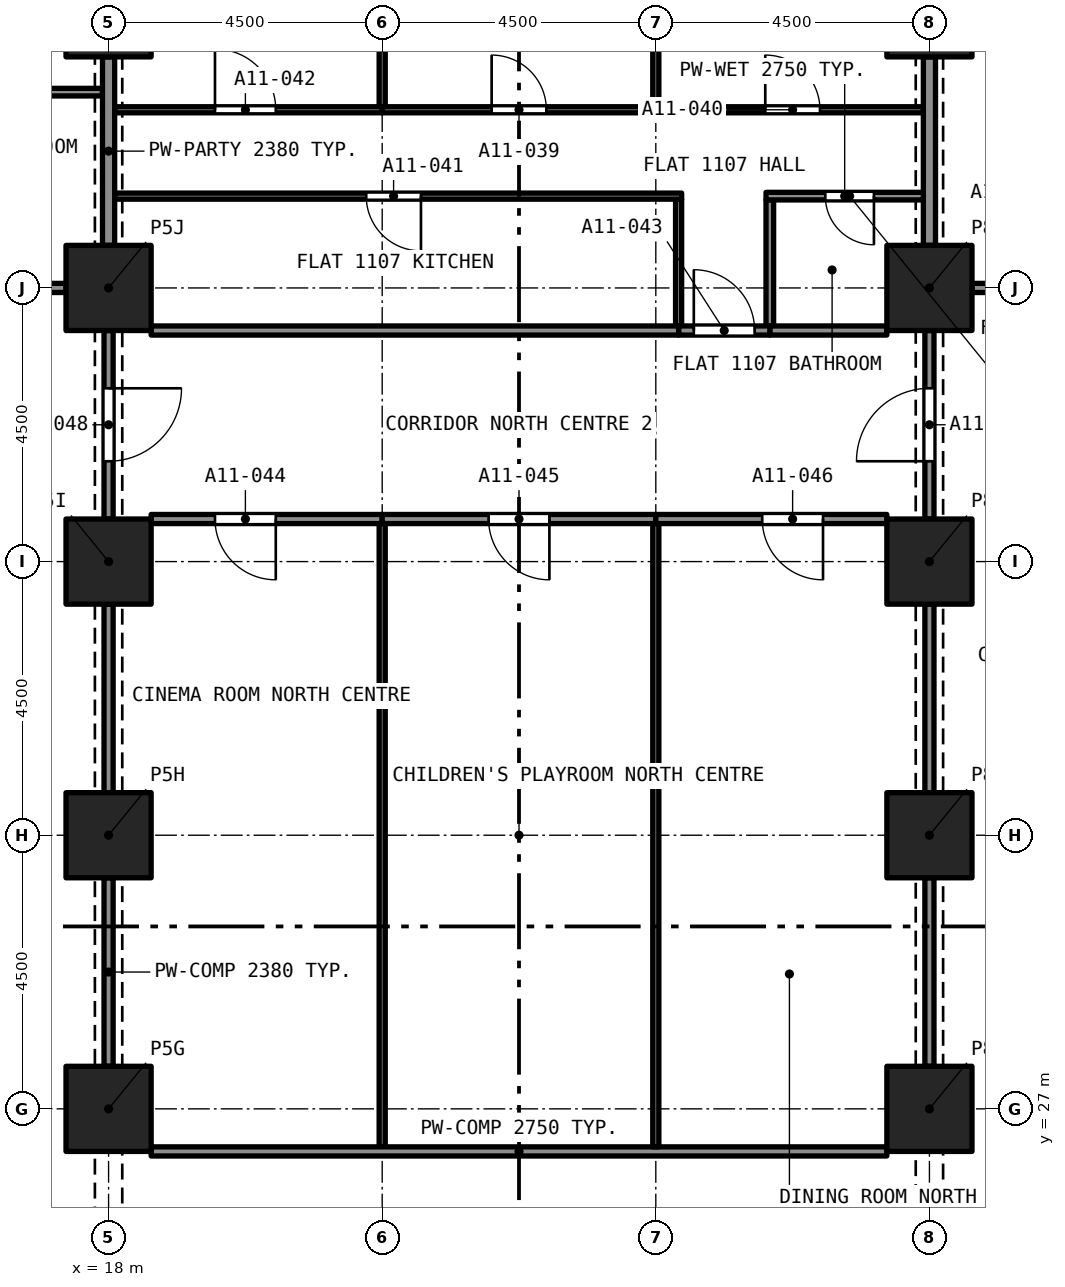
"""IFC4 building model, lengths in metres.
Left out: names, types, materials, properties, quantities, classifications, styles, units other than length and angle.
Written with IfcOpenShell. Run it as: python <this file> out.ifc"""

import sys

from ifc_helpers import new_model, si_unit, direction, frame, frame_2d, origin, origin_2d, place, context, subcontext, project, spatial, rectangle, extrude, element, fill, save


model = new_model("IFC4")
c1 = context("Model", 3, precision=1e-05, world=origin(), true_north=direction((0.0, 1.0)))
c2 = subcontext(c1, "Body", "Model", "MODEL_VIEW")
j1 = project(units=[si_unit("LENGTHUNIT", "METRE"), si_unit("PLANEANGLEUNIT", "RADIAN")], contexts=[c1])
p1 = place(None, origin())
s1 = spatial("IfcSite", under=j1, at=p1, CompositionType="ELEMENT")
p2 = place(p1, origin())
s2 = spatial("IfcBuilding", under=s1, at=p2, CompositionType="ELEMENT")
p3 = place(p2, frame((0.0, 0.0, 46.4)))
s3 = spatial("IfcBuildingStorey", under=s2, at=p3, CompositionType="ELEMENT", Elevation=46.4)
for number, where, z_axis, x_axis in (
    (1, (18.0, 27.0, 0.0), (0.0, 0.0, 1.0), (1.0, 0.0, 0.0)),
    (2, (31.5, 27.0, 0.0), (0.0, 0.0, 1.0), (1.0, 0.0, 0.0)),
    (3, (18.0, 31.5, 0.0), (0.0, 0.0, 1.0), (1.0, 0.0, 0.0)),
    (4, (31.5, 31.5, 0.0), (0.0, 0.0, 1.0), (1.0, 0.0, 0.0)),
    (5, (18.0, 36.0, 0.0), (0.0, 0.0, 1.0), (1.0, 0.0, 0.0)),
    (6, (31.5, 36.0, 0.0), (0.0, 0.0, 1.0), (1.0, 0.0, 0.0)),
    (7, (18.0, 40.5, 0.0), (0.0, 0.0, 1.0), (1.0, 0.0, 0.0)),
    (8, (31.5, 40.5, 0.0), (0.0, 0.0, 1.0), (1.0, 0.0, 0.0)),
    (9, (18.0, 45.0, 0.0), (0.0, 0.0, 1.0), (1.0, 0.0, 0.0)),
    (10, (31.5, 45.0, 0.0), (0.0, 0.0, 1.0), (1.0, 0.0, 0.0)),
):
    element("IfcColumn", number, at=place(p3, frame(where, z_axis=z_axis, x_axis=x_axis)), inside=s3, PredefinedType="COLUMN", context=c2, shape_type="SweptSolid", body=[
        extrude(rectangle(XDim=1.4, YDim=1.4, at=origin_2d()), origin(), (0.0, 0.0, 1.0), 3.2),
    ])
p4 = place(p3, frame((17.9, 43.72, 0.0), z_axis=(0.0, 0.0, 1.0), x_axis=(-1.0, 0.0, 0.0)))
e11 = element("IfcWall", 11, at=p4, inside=s3, PredefinedType="PARTITIONING", context=c2, shape_type="SweptSolid", body=[
    extrude(rectangle(XDim=4.327, YDim=0.125, at=frame_2d((2.163, 0.0))), origin(), (0.0, 0.0, 1.0), 2.9),
])
p5 = place(p4, frame((1.713, 0.0, 0.0)))
e12 = element("IfcOpeningElement", 12, at=p5, cuts=e11, PredefinedType="OPENING", context=c2, shape_type="SweptSolid", body=[
    extrude(rectangle(XDim=0.8, YDim=2.1, at=frame_2d((0.4, 1.05))), frame((0.0, 0.073, 0.0), z_axis=(0.0, -1.0, 0.0), x_axis=(1.0, 0.0, 0.0)), (0.0, 0.0, 1.0), 0.145),
])
p6 = place(p3, frame((18.0, 41.2, 0.0), z_axis=(0.0, 0.0, 1.0), x_axis=(0.0, 1.0, 0.0)))
e13 = element("IfcWall", 13, at=p6, inside=s3, PredefinedType="PARTITIONING", context=c2, shape_type="SweptSolid", body=[
    extrude(rectangle(XDim=3.1, YDim=0.2, at=frame_2d((1.55, 0.0))), origin(), (0.0, 0.0, 1.0), 2.38),
])
p7 = place(p3, frame((13.511, 40.5, 0.0), z_axis=(0.0, 0.0, 1.0), x_axis=(1.0, 0.0, 0.0)))
e14 = element("IfcWall", 14, at=p7, inside=s3, PredefinedType="PARTITIONING", context=c2, shape_type="SweptSolid", body=[
    extrude(rectangle(XDim=3.789, YDim=0.15, at=frame_2d((1.895, 0.0))), origin(), (0.0, 0.0, 1.0), 2.9),
])
p8 = place(p3, frame((31.5, 41.2, 0.0), z_axis=(0.0, 0.0, 1.0), x_axis=(0.0, 1.0, 0.0)))
e15 = element("IfcWall", 15, at=p8, inside=s3, PredefinedType="PARTITIONING", context=c2, shape_type="SweptSolid", body=[
    extrude(rectangle(XDim=3.1, YDim=0.2, at=frame_2d((1.55, 0.0))), origin(), (0.0, 0.0, 1.0), 2.38),
])
p9 = place(p3, frame((32.2, 40.5, 0.0), z_axis=(0.0, 0.0, 1.0), x_axis=(1.0, 0.0, 0.0)))
e16 = element("IfcWall", 16, at=p9, inside=s3, PredefinedType="PARTITIONING", context=c2, shape_type="SweptSolid", body=[
    extrude(rectangle(XDim=2.3, YDim=0.15, at=frame_2d((1.15, 0.0))), origin(), (0.0, 0.0, 1.0), 2.9),
])
p10 = place(p9, frame((1.05, 0.0, 0.0)))
e17 = element("IfcOpeningElement", 17, at=p10, cuts=e16, PredefinedType="OPENING", context=c2, shape_type="SweptSolid", body=[
    extrude(rectangle(XDim=1.0, YDim=2.1, at=frame_2d((0.5, 1.05))), frame((0.0, 0.085, 0.0), z_axis=(0.0, -1.0, 0.0), x_axis=(1.0, 0.0, 0.0)), (0.0, 0.0, 1.0), 0.17),
])
p11 = place(p3, frame((28.875, 39.875, 0.0), z_axis=(0.0, 0.0, 1.0), x_axis=(0.0, 1.0, 0.0)))
e18 = element("IfcWall", 18, at=p11, inside=s3, PredefinedType="PARTITIONING", context=c2, shape_type="SweptSolid", body=[
    extrude(rectangle(XDim=2.073, YDim=0.125, at=frame_2d((1.036, 0.0))), origin(), (0.0, 0.0, 1.0), 2.75),
])
p12 = place(p3, frame((31.4, 42.01, 0.0), z_axis=(0.0, 0.0, 1.0), x_axis=(-1.0, 0.0, 0.0)))
e19 = element("IfcWall", 19, at=p12, inside=s3, PredefinedType="PARTITIONING", context=c2, shape_type="SweptSolid", body=[
    extrude(rectangle(XDim=2.587, YDim=0.125, at=frame_2d((1.294, 0.0))), origin(), (0.0, 0.0, 1.0), 2.75),
])
p13 = place(p12, frame((0.812, 0.0, 0.0)))
e20 = element("IfcOpeningElement", 20, at=p13, cuts=e19, PredefinedType="OPENING", context=c2, shape_type="SweptSolid", body=[
    extrude(rectangle(XDim=0.8, YDim=2.1, at=frame_2d((0.4, 1.05))), frame((0.0, 0.073, 0.0), z_axis=(0.0, -1.0, 0.0), x_axis=(1.0, 0.0, 0.0)), (0.0, 0.0, 1.0), 0.145),
])
p14 = place(p3, frame((28.875, 39.8, 0.0), z_axis=(0.0, 0.0, 1.0), x_axis=(1.0, 0.0, 0.0)))
e21 = element("IfcWall", 21, at=p14, inside=s3, PredefinedType="PARTITIONING", context=c2, shape_type="SweptSolid", body=[
    extrude(rectangle(XDim=1.925, YDim=0.15, at=frame_2d((0.962, 0.0))), origin(), (0.0, 0.0, 1.0), 2.75),
])
p15 = place(p3, frame((27.0, 43.48, 0.0), z_axis=(0.0, 0.0, 1.0), x_axis=(0.0, 1.0, 0.0)))
e22 = element("IfcWall", 22, at=p15, inside=s3, PredefinedType="PARTITIONING", context=c2, shape_type="SweptSolid", body=[
    extrude(rectangle(XDim=5.32, YDim=0.1, at=frame_2d((2.66, 0.0))), origin(), (0.0, 0.0, 1.0), 2.75),
])
p16 = place(p3, frame((22.5, 43.43, 0.0), z_axis=(0.0, 0.0, 1.0), x_axis=(1.0, 0.0, 0.0)))
e23 = element("IfcWall", 23, at=p16, inside=s3, PredefinedType="PARTITIONING", context=c2, shape_type="SweptSolid", body=[
    extrude(rectangle(XDim=4.5, YDim=0.1, at=frame_2d((2.25, 0.0))), origin(), (0.0, 0.0, 1.0), 2.75),
])
p17 = place(p16, frame((1.8, 0.0, 0.0)))
e24 = element("IfcOpeningElement", 24, at=p17, cuts=e23, PredefinedType="OPENING", context=c2, shape_type="SweptSolid", body=[
    extrude(rectangle(XDim=0.9, YDim=2.1, at=frame_2d((0.45, 1.05))), frame((0.0, 0.06, 0.0), z_axis=(0.0, -1.0, 0.0), x_axis=(1.0, 0.0, 0.0)), (0.0, 0.0, 1.0), 0.12),
])
p18 = place(p3, frame((22.5, 43.48, 0.0), z_axis=(0.0, 0.0, 1.0), x_axis=(0.0, 1.0, 0.0)))
e25 = element("IfcWall", 25, at=p18, inside=s3, PredefinedType="PARTITIONING", context=c2, shape_type="SweptSolid", body=[
    extrude(rectangle(XDim=5.32, YDim=0.1, at=frame_2d((2.66, 0.0))), origin(), (0.0, 0.0, 1.0), 2.75),
])
p19 = place(p3, frame((27.0, 43.43, 0.0), z_axis=(0.0, 0.0, 1.0), x_axis=(1.0, 0.0, 0.0)))
e26 = element("IfcWall", 26, at=p19, inside=s3, PredefinedType="PARTITIONING", context=c2, shape_type="SweptSolid", body=[
    extrude(rectangle(XDim=4.4, YDim=0.1, at=frame_2d((2.2, 0.0))), origin(), (0.0, 0.0, 1.0), 2.75),
])
p20 = place(p19, frame((1.8, 0.0, 0.0)))
e27 = element("IfcOpeningElement", 27, at=p20, cuts=e26, PredefinedType="OPENING", context=c2, shape_type="SweptSolid", body=[
    extrude(rectangle(XDim=0.9, YDim=2.1, at=frame_2d((0.45, 1.05))), frame((0.0, 0.06, 0.0), z_axis=(0.0, -1.0, 0.0), x_axis=(1.0, 0.0, 0.0)), (0.0, 0.0, 1.0), 0.12),
])
p21 = place(p3, frame((27.375, 39.875, 0.0), z_axis=(0.0, 0.0, 1.0), x_axis=(0.0, 1.0, 0.0)))
e28 = element("IfcWall", 28, at=p21, inside=s3, PredefinedType="PARTITIONING", context=c2, shape_type="SweptSolid", body=[
    extrude(rectangle(XDim=2.085, YDim=0.1, at=frame_2d((1.042, 0.0))), origin(), (0.0, 0.0, 1.0), 2.75),
])
p22 = place(p3, frame((27.425, 42.01, 0.0), z_axis=(0.0, 0.0, 1.0), x_axis=(-1.0, 0.0, 0.0)))
e29 = element("IfcWall", 29, at=p22, inside=s3, PredefinedType="PARTITIONING", context=c2, shape_type="SweptSolid", body=[
    extrude(rectangle(XDim=9.325, YDim=0.1, at=frame_2d((4.663, 0.0))), origin(), (0.0, 0.0, 1.0), 2.75),
])
p23 = place(p22, frame((4.288, 0.0, 0.0)))
e30 = element("IfcOpeningElement", 30, at=p23, cuts=e29, PredefinedType="OPENING", context=c2, shape_type="SweptSolid", body=[
    extrude(rectangle(XDim=0.9, YDim=2.1, at=frame_2d((0.45, 1.05))), frame((0.0, 0.06, 0.0), z_axis=(0.0, -1.0, 0.0), x_axis=(1.0, 0.0, 0.0)), (0.0, 0.0, 1.0), 0.12),
])
p24 = place(p3, frame((18.1, 43.43, 0.0), z_axis=(0.0, 0.0, 1.0), x_axis=(1.0, 0.0, 0.0)))
e31 = element("IfcWall", 31, at=p24, inside=s3, PredefinedType="PARTITIONING", context=c2, shape_type="SweptSolid", body=[
    extrude(rectangle(XDim=4.4, YDim=0.1, at=frame_2d((2.2, 0.0))), origin(), (0.0, 0.0, 1.0), 2.75),
])
p25 = place(p24, frame((1.65, 0.0, 0.0)))
e32 = element("IfcOpeningElement", 32, at=p25, cuts=e31, PredefinedType="OPENING", context=c2, shape_type="SweptSolid", body=[
    extrude(rectangle(XDim=1.0, YDim=2.1, at=frame_2d((0.5, 1.05))), frame((0.0, 0.06, 0.0), z_axis=(0.0, -1.0, 0.0), x_axis=(1.0, 0.0, 0.0)), (0.0, 0.0, 1.0), 0.12),
])
p26 = place(p3, frame((27.375, 39.8, 0.0), z_axis=(0.0, 0.0, 1.0), x_axis=(1.0, 0.0, 0.0)))
e33 = element("IfcWall", 33, at=p26, inside=s3, PredefinedType="PARTITIONING", context=c2, shape_type="SweptSolid", body=[
    extrude(rectangle(XDim=1.5, YDim=0.15, at=frame_2d((0.75, 0.0))), origin(), (0.0, 0.0, 1.0), 2.75),
])
p27 = place(p26, frame((0.25, 0.0, 0.0)))
e34 = element("IfcOpeningElement", 34, at=p27, cuts=e33, PredefinedType="OPENING", context=c2, shape_type="SweptSolid", body=[
    extrude(rectangle(XDim=1.0, YDim=2.1, at=frame_2d((0.5, 1.05))), frame((0.0, 0.085, 0.0), z_axis=(0.0, -1.0, 0.0), x_axis=(1.0, 0.0, 0.0)), (0.0, 0.0, 1.0), 0.17),
])
p28 = place(p3, frame((18.7, 39.8, 0.0), z_axis=(0.0, 0.0, 1.0), x_axis=(1.0, 0.0, 0.0)))
e35 = element("IfcWall", 35, at=p28, inside=s3, PredefinedType="PARTITIONING", context=c2, shape_type="SweptSolid", body=[
    extrude(rectangle(XDim=8.675, YDim=0.15, at=frame_2d((4.337, 0.0))), origin(), (0.0, 0.0, 1.0), 2.75),
])
p29 = place(p3, frame((22.5, 36.7, 0.0), z_axis=(0.0, 0.0, 1.0), x_axis=(-1.0, 0.0, 0.0)))
e36 = element("IfcWall", 36, at=p29, inside=s3, PredefinedType="PARTITIONING", context=c2, shape_type="SweptSolid", body=[
    extrude(rectangle(XDim=3.8, YDim=0.15, at=frame_2d((1.9, 0.0))), origin(), (0.0, 0.0, 1.0), 2.75),
])
p30 = place(p29, frame((1.75, 0.0, 0.0)))
e37 = element("IfcOpeningElement", 37, at=p30, cuts=e36, PredefinedType="OPENING", context=c2, shape_type="SweptSolid", body=[
    extrude(rectangle(XDim=1.0, YDim=2.1, at=frame_2d((0.5, 1.05))), frame((0.0, 0.085, 0.0), z_axis=(0.0, -1.0, 0.0), x_axis=(1.0, 0.0, 0.0)), (0.0, 0.0, 1.0), 0.17),
])
p31 = place(p3, frame((27.0, 36.7, 0.0), z_axis=(0.0, 0.0, 1.0), x_axis=(-1.0, 0.0, 0.0)))
e38 = element("IfcWall", 38, at=p31, inside=s3, PredefinedType="PARTITIONING", context=c2, shape_type="SweptSolid", body=[
    extrude(rectangle(XDim=4.5, YDim=0.15, at=frame_2d((2.25, 0.0))), origin(), (0.0, 0.0, 1.0), 2.75),
])
p32 = place(p31, frame((1.75, 0.0, 0.0)))
e39 = element("IfcOpeningElement", 39, at=p32, cuts=e38, PredefinedType="OPENING", context=c2, shape_type="SweptSolid", body=[
    extrude(rectangle(XDim=1.0, YDim=2.1, at=frame_2d((0.5, 1.05))), frame((0.0, 0.085, 0.0), z_axis=(0.0, -1.0, 0.0), x_axis=(1.0, 0.0, 0.0)), (0.0, 0.0, 1.0), 0.17),
])
p33 = place(p3, frame((30.8, 36.7, 0.0), z_axis=(0.0, 0.0, 1.0), x_axis=(-1.0, 0.0, 0.0)))
e40 = element("IfcWall", 40, at=p33, inside=s3, PredefinedType="PARTITIONING", context=c2, shape_type="SweptSolid", body=[
    extrude(rectangle(XDim=3.8, YDim=0.15, at=frame_2d((1.9, 0.0))), origin(), (0.0, 0.0, 1.0), 2.75),
])
p34 = place(p33, frame((1.05, 0.0, 0.0)))
e41 = element("IfcOpeningElement", 41, at=p34, cuts=e40, PredefinedType="OPENING", context=c2, shape_type="SweptSolid", body=[
    extrude(rectangle(XDim=1.0, YDim=2.1, at=frame_2d((0.5, 1.05))), frame((0.0, 0.085, 0.0), z_axis=(0.0, -1.0, 0.0), x_axis=(1.0, 0.0, 0.0)), (0.0, 0.0, 1.0), 0.17),
])
p35 = place(p3, frame((31.5, 36.7, 0.0), z_axis=(0.0, 0.0, 1.0), x_axis=(0.0, 1.0, 0.0)))
e42 = element("IfcWall", 42, at=p35, inside=s3, PredefinedType="PARTITIONING", context=c2, shape_type="SweptSolid", body=[
    extrude(rectangle(XDim=3.1, YDim=0.15, at=frame_2d((1.55, 0.0))), origin(), (0.0, 0.0, 1.0), 2.38),
])
p36 = place(p35, frame((0.95, 0.0, 0.0)))
e43 = element("IfcOpeningElement", 43, at=p36, cuts=e42, PredefinedType="OPENING", context=c2, shape_type="SweptSolid", body=[
    extrude(rectangle(XDim=1.2, YDim=2.1, at=frame_2d((0.6, 1.05))), frame((0.0, 0.085, 0.0), z_axis=(0.0, -1.0, 0.0), x_axis=(1.0, 0.0, 0.0)), (0.0, 0.0, 1.0), 0.17),
])
p37 = place(p3, frame((18.0, 39.8, 0.0), z_axis=(0.0, 0.0, 1.0), x_axis=(0.0, -1.0, 0.0)))
e44 = element("IfcWall", 44, at=p37, inside=s3, PredefinedType="PARTITIONING", context=c2, shape_type="SweptSolid", body=[
    extrude(rectangle(XDim=3.1, YDim=0.15, at=frame_2d((1.55, 0.0))), origin(), (0.0, 0.0, 1.0), 2.38),
])
p38 = place(p37, frame((0.95, 0.0, 0.0)))
e45 = element("IfcOpeningElement", 45, at=p38, cuts=e44, PredefinedType="OPENING", context=c2, shape_type="SweptSolid", body=[
    extrude(rectangle(XDim=1.2, YDim=2.1, at=frame_2d((0.6, 1.05))), frame((0.0, 0.085, 0.0), z_axis=(0.0, -1.0, 0.0), x_axis=(1.0, 0.0, 0.0)), (0.0, 0.0, 1.0), 0.17),
])
p39 = place(p3, frame((22.5, 26.375, 0.0), z_axis=(0.0, 0.0, 1.0), x_axis=(0.0, 1.0, 0.0)))
e46 = element("IfcWall", 46, at=p39, inside=s3, PredefinedType="PARTITIONING", context=c2, shape_type="SweptSolid", body=[
    extrude(rectangle(XDim=10.25, YDim=0.1, at=frame_2d((5.125, 0.0))), origin(), (0.0, 0.0, 1.0), 2.75),
])
for number, where, z_axis, x_axis in (
    (47, (18.0, 27.7, 0.0), (0.0, 0.0, 1.0), (0.0, 1.0, 0.0)),
    (48, (18.0, 32.2, 0.0), (0.0, 0.0, 1.0), (0.0, 1.0, 0.0)),
):
    element("IfcWall", number, at=place(p3, frame(where, z_axis=z_axis, x_axis=x_axis)), inside=s3, PredefinedType="PARTITIONING", context=c2, shape_type="SweptSolid", body=[
        extrude(rectangle(XDim=3.1, YDim=0.15, at=frame_2d((1.55, 0.0))), origin(), (0.0, 0.0, 1.0), 2.38),
    ])
p40 = place(p3, frame((18.7, 26.3, 0.0), z_axis=(0.0, 0.0, 1.0), x_axis=(1.0, 0.0, 0.0)))
e49 = element("IfcWall", 49, at=p40, inside=s3, PredefinedType="PARTITIONING", context=c2, shape_type="SweptSolid", body=[
    extrude(rectangle(XDim=12.1, YDim=0.15, at=frame_2d((6.05, 0.0))), origin(), (0.0, 0.0, 1.0), 2.75),
])
p41 = place(p3, frame((27.0, 26.375, 0.0), z_axis=(0.0, 0.0, 1.0), x_axis=(0.0, 1.0, 0.0)))
e50 = element("IfcWall", 50, at=p41, inside=s3, PredefinedType="PARTITIONING", context=c2, shape_type="SweptSolid", body=[
    extrude(rectangle(XDim=10.25, YDim=0.1, at=frame_2d((5.125, 0.0))), origin(), (0.0, 0.0, 1.0), 2.75),
])
for number, where, z_axis, x_axis in (
    (51, (31.5, 32.2, 0.0), (0.0, 0.0, 1.0), (0.0, 1.0, 0.0)),
    (52, (31.5, 27.7, 0.0), (0.0, 0.0, 1.0), (0.0, 1.0, 0.0)),
):
    element("IfcWall", number, at=place(p3, frame(where, z_axis=z_axis, x_axis=x_axis)), inside=s3, PredefinedType="PARTITIONING", context=c2, shape_type="SweptSolid", body=[
        extrude(rectangle(XDim=3.1, YDim=0.15, at=frame_2d((1.55, 0.0))), origin(), (0.0, 0.0, 1.0), 2.38),
    ])
p42 = place(p13, origin())
e53 = element("IfcDoor", 53, at=p42, inside=s3, OperationType="SINGLE_SWING_LEFT", PredefinedType="DOOR", context=c2, shape_type="SweptSolid", body=[
    extrude(rectangle(XDim=0.8, YDim=2.1, at=frame_2d((0.4, 1.05))), frame((0.0, 0.025, 0.0), z_axis=(0.0, -1.0, 0.0), x_axis=(1.0, 0.0, 0.0)), (0.0, 0.0, 1.0), 0.05),
])
fill(e20, e53)
p43 = place(p17, origin())
e54 = element("IfcDoor", 54, at=p43, inside=s3, OperationType="SINGLE_SWING_LEFT", PredefinedType="DOOR", context=c2, shape_type="SweptSolid", body=[
    extrude(rectangle(XDim=0.9, YDim=2.1, at=frame_2d((0.45, 1.05))), frame((0.0, 0.025, 0.0), z_axis=(0.0, -1.0, 0.0), x_axis=(1.0, 0.0, 0.0)), (0.0, 0.0, 1.0), 0.05),
])
fill(e24, e54)
p44 = place(p20, origin())
e55 = element("IfcDoor", 55, at=p44, inside=s3, OperationType="SINGLE_SWING_RIGHT", PredefinedType="DOOR", context=c2, shape_type="SweptSolid", body=[
    extrude(rectangle(XDim=0.9, YDim=2.1, at=frame_2d((0.45, 1.05))), frame((0.0, 0.025, 0.0), z_axis=(0.0, -1.0, 0.0), x_axis=(1.0, 0.0, 0.0)), (0.0, 0.0, 1.0), 0.05),
])
fill(e27, e55)
p45 = place(p23, origin())
e56 = element("IfcDoor", 56, at=p45, inside=s3, OperationType="SINGLE_SWING_RIGHT", PredefinedType="DOOR", context=c2, shape_type="SweptSolid", body=[
    extrude(rectangle(XDim=0.9, YDim=2.1, at=frame_2d((0.45, 1.05))), frame((0.0, 0.025, 0.0), z_axis=(0.0, -1.0, 0.0), x_axis=(1.0, 0.0, 0.0)), (0.0, 0.0, 1.0), 0.05),
])
fill(e30, e56)
p46 = place(p25, origin())
e57 = element("IfcDoor", 57, at=p46, inside=s3, OperationType="SINGLE_SWING_LEFT", PredefinedType="DOOR", context=c2, shape_type="SweptSolid", body=[
    extrude(rectangle(XDim=1.0, YDim=2.1, at=frame_2d((0.5, 1.05))), frame((0.0, 0.025, 0.0), z_axis=(0.0, -1.0, 0.0), x_axis=(1.0, 0.0, 0.0)), (0.0, 0.0, 1.0), 0.05),
])
fill(e32, e57)
p47 = place(p27, origin())
e58 = element("IfcDoor", 58, at=p47, inside=s3, OperationType="SINGLE_SWING_RIGHT", PredefinedType="DOOR", context=c2, shape_type="SweptSolid", body=[
    extrude(rectangle(XDim=1.0, YDim=2.1, at=frame_2d((0.5, 1.05))), frame((0.0, 0.025, 0.0), z_axis=(0.0, -1.0, 0.0), x_axis=(1.0, 0.0, 0.0)), (0.0, 0.0, 1.0), 0.05),
])
fill(e34, e58)
p48 = place(p30, origin())
e59 = element("IfcDoor", 59, at=p48, inside=s3, OperationType="SINGLE_SWING_RIGHT", PredefinedType="DOOR", context=c2, shape_type="SweptSolid", body=[
    extrude(rectangle(XDim=1.0, YDim=2.1, at=frame_2d((0.5, 1.05))), frame((0.0, 0.025, 0.0), z_axis=(0.0, -1.0, 0.0), x_axis=(1.0, 0.0, 0.0)), (0.0, 0.0, 1.0), 0.05),
])
fill(e37, e59)
p49 = place(p32, origin())
e60 = element("IfcDoor", 60, at=p49, inside=s3, OperationType="SINGLE_SWING_RIGHT", PredefinedType="DOOR", context=c2, shape_type="SweptSolid", body=[
    extrude(rectangle(XDim=1.0, YDim=2.1, at=frame_2d((0.5, 1.05))), frame((0.0, 0.025, 0.0), z_axis=(0.0, -1.0, 0.0), x_axis=(1.0, 0.0, 0.0)), (0.0, 0.0, 1.0), 0.05),
])
fill(e39, e60)
p50 = place(p34, origin())
e61 = element("IfcDoor", 61, at=p50, inside=s3, OperationType="SINGLE_SWING_LEFT", PredefinedType="DOOR", context=c2, shape_type="SweptSolid", body=[
    extrude(rectangle(XDim=1.0, YDim=2.1, at=frame_2d((0.5, 1.05))), frame((0.0, 0.025, 0.0), z_axis=(0.0, -1.0, 0.0), x_axis=(1.0, 0.0, 0.0)), (0.0, 0.0, 1.0), 0.05),
])
fill(e41, e61)
p51 = place(p36, origin())
e62 = element("IfcDoor", 62, at=p51, inside=s3, OperationType="SINGLE_SWING_LEFT", PredefinedType="DOOR", context=c2, shape_type="SweptSolid", body=[
    extrude(rectangle(XDim=1.2, YDim=2.1, at=frame_2d((0.6, 1.05))), frame((0.0, 0.025, 0.0), z_axis=(0.0, -1.0, 0.0), x_axis=(1.0, 0.0, 0.0)), (0.0, 0.0, 1.0), 0.05),
])
fill(e43, e62)
p52 = place(p38, origin())
e63 = element("IfcDoor", 63, at=p52, inside=s3, OperationType="SINGLE_SWING_LEFT", PredefinedType="DOOR", context=c2, shape_type="SweptSolid", body=[
    extrude(rectangle(XDim=1.2, YDim=2.1, at=frame_2d((0.6, 1.05))), frame((0.0, 0.025, 0.0), z_axis=(0.0, -1.0, 0.0), x_axis=(1.0, 0.0, 0.0)), (0.0, 0.0, 1.0), 0.05),
])
fill(e45, e63)
save(model, sys.argv[1])
